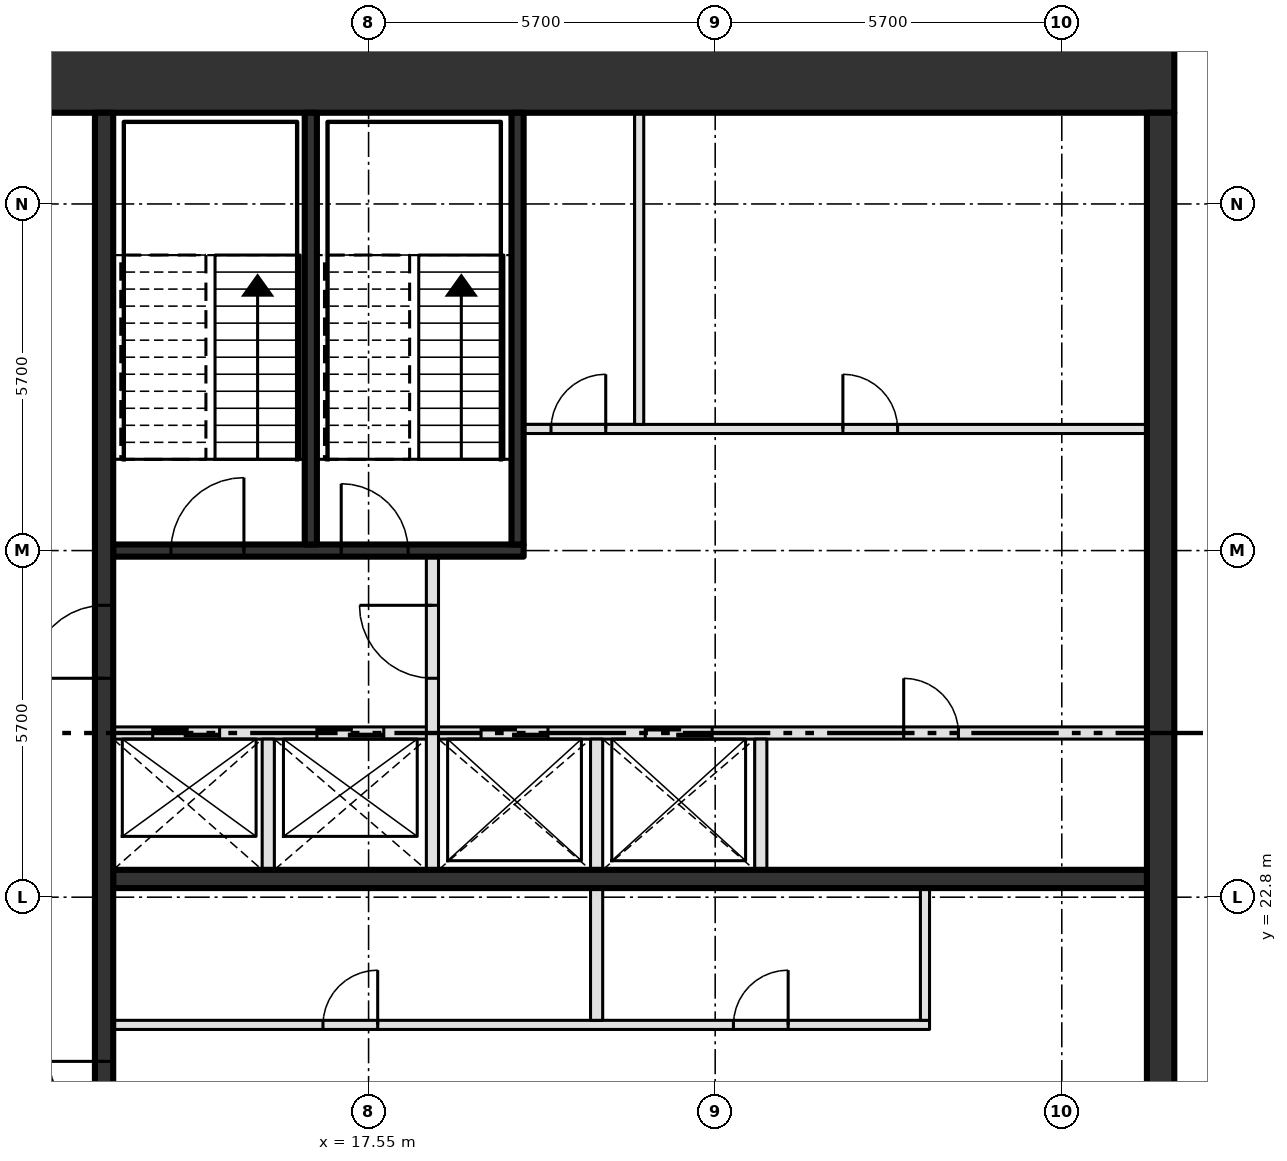
"""IFC4 building model, lengths in metres.
Left out: names, types, materials, properties, quantities, classifications, styles, units other than length and angle.
Written with IfcOpenShell. Run it as: python <this file> out.ifc"""

import sys

from ifc_helpers import new_model, si_unit, direction, frame, frame_2d, origin, place, context, subcontext, project, spatial, rectangle, extrude, element, fill, save


model = new_model("IFC4")
c1 = context("Model", 3, precision=1e-05, world=origin(), true_north=direction((0.0, 1.0)))
c2 = subcontext(c1, "Body", "Model", "MODEL_VIEW")
j1 = project(units=[si_unit("LENGTHUNIT", "METRE"), si_unit("PLANEANGLEUNIT", "RADIAN")], contexts=[c1])
p1 = place(None, origin())
s1 = spatial("IfcSite", under=j1, at=p1, CompositionType="ELEMENT")
p2 = place(p1, origin())
s2 = spatial("IfcBuilding", under=s1, at=p2, CompositionType="ELEMENT")
p3 = place(p2, frame((0.0, 0.0, 400.2)))
s3 = spatial("IfcBuildingStorey", under=s2, at=p3, CompositionType="ELEMENT", Elevation=400.2)
p4 = place(p3, frame((8.0, 36.3, -0.45), z_axis=(0.0, 0.0, 1.0), x_axis=(1.0, 0.0, 0.0)))
e1 = element("IfcWall", 1, at=p4, inside=s3, PredefinedType="SHEAR", context=c2, shape_type="SweptSolid", body=[
    extrude(rectangle(XDim=22.8, YDim=1.2, at=frame_2d((11.4, 0.0))), origin(), (0.0, 0.0, 1.0), 4.95),
])
p5 = place(p4, frame((2.3, 0.0, 0.45)))
e2 = element("IfcOpeningElement", 2, at=p5, cuts=e1, PredefinedType="OPENING", context=c2, shape_type="SweptSolid", body=[
    extrude(rectangle(XDim=1.8, YDim=2.1, at=frame_2d((0.9, 1.05))), frame((0.0, 0.61, 0.0), z_axis=(0.0, -1.0, 0.0), x_axis=(1.0, 0.0, 0.0)), (0.0, 0.0, 1.0), 1.22),
])
p6 = place(p3, frame((30.575, 14.55, -0.45), z_axis=(0.0, 0.0, 1.0), x_axis=(0.0, 1.0, 0.0)))
e3 = element("IfcWall", 3, at=p6, inside=s3, PredefinedType="SHEAR", context=c2, shape_type="SweptSolid", body=[
    extrude(rectangle(XDim=21.15, YDim=0.45, at=frame_2d((10.575, 0.0))), origin(), (0.0, 0.0, 1.0), 4.95),
])
p7 = place(p3, frame((13.35, 20.7, 0.0), z_axis=(0.0, 0.0, 1.0), x_axis=(1.0, 0.0, 0.0)))
e4 = element("IfcWall", 4, at=p7, inside=s3, PredefinedType="PARTITIONING", context=c2, shape_type="SweptSolid", body=[
    extrude(rectangle(XDim=13.425, YDim=0.15, at=frame_2d((6.712, 0.0))), origin(), (0.0, 0.0, 1.0), 4.5),
])
p8 = place(p7, frame((3.45, 0.0, 0.0)))
e5 = element("IfcOpeningElement", 5, at=p8, cuts=e4, PredefinedType="OPENING", context=c2, shape_type="SweptSolid", body=[
    extrude(rectangle(XDim=0.9, YDim=2.1, at=frame_2d((0.45, 1.05))), frame((0.0, 0.085, 0.0), z_axis=(0.0, -1.0, 0.0), x_axis=(1.0, 0.0, 0.0)), (0.0, 0.0, 1.0), 0.17),
])
p9 = place(p7, frame((10.2, 0.0, 0.0)))
e6 = element("IfcOpeningElement", 6, at=p9, cuts=e4, PredefinedType="OPENING", context=c2, shape_type="SweptSolid", body=[
    extrude(rectangle(XDim=0.9, YDim=2.1, at=frame_2d((0.45, 1.05))), frame((0.0, 0.085, 0.0), z_axis=(0.0, -1.0, 0.0), x_axis=(1.0, 0.0, 0.0)), (0.0, 0.0, 1.0), 0.17),
])
p10 = place(p3, frame((13.35, 23.1, 0.0), z_axis=(0.0, 0.0, 1.0), x_axis=(1.0, 0.0, 0.0)))
e7 = element("IfcWall", 7, at=p10, inside=s3, PredefinedType="SHEAR", context=c2, shape_type="SweptSolid", body=[
    extrude(rectangle(XDim=17.0, YDim=0.3, at=frame_2d((8.5, 0.0))), origin(), (0.0, 0.0, 1.0), 4.5),
])
p11 = place(p3, frame((13.35, 25.5, 0.0), z_axis=(0.0, 0.0, 1.0), x_axis=(1.0, 0.0, 0.0)))
e8 = element("IfcWall", 8, at=p11, inside=s3, PredefinedType="SOLIDWALL", context=c2, shape_type="SweptSolid", body=[
    extrude(rectangle(XDim=17.0, YDim=0.2, at=frame_2d((8.5, 0.0))), origin(), (0.0, 0.0, 1.0), 4.5),
])
p12 = place(p11, frame((0.65, 0.0, 0.0)))
e9 = element("IfcOpeningElement", 9, at=p12, cuts=e8, PredefinedType="OPENING", context=c2, shape_type="SweptSolid", body=[
    extrude(rectangle(XDim=1.1, YDim=2.1, at=frame_2d((0.55, 1.05))), frame((0.0, 0.11, 0.0), z_axis=(0.0, -1.0, 0.0), x_axis=(1.0, 0.0, 0.0)), (0.0, 0.0, 1.0), 0.22),
])
p13 = place(p11, frame((3.35, 0.0, 0.0)))
e10 = element("IfcOpeningElement", 10, at=p13, cuts=e8, PredefinedType="OPENING", context=c2, shape_type="SweptSolid", body=[
    extrude(rectangle(XDim=1.1, YDim=2.1, at=frame_2d((0.55, 1.05))), frame((0.0, 0.11, 0.0), z_axis=(0.0, -1.0, 0.0), x_axis=(1.0, 0.0, 0.0)), (0.0, 0.0, 1.0), 0.22),
])
p14 = place(p11, frame((6.05, 0.0, 0.0)))
e11 = element("IfcOpeningElement", 11, at=p14, cuts=e8, PredefinedType="OPENING", context=c2, shape_type="SweptSolid", body=[
    extrude(rectangle(XDim=1.1, YDim=2.1, at=frame_2d((0.55, 1.05))), frame((0.0, 0.11, 0.0), z_axis=(0.0, -1.0, 0.0), x_axis=(1.0, 0.0, 0.0)), (0.0, 0.0, 1.0), 0.22),
])
p15 = place(p11, frame((8.75, 0.0, 0.0)))
e12 = element("IfcOpeningElement", 12, at=p15, cuts=e8, PredefinedType="OPENING", context=c2, shape_type="SweptSolid", body=[
    extrude(rectangle(XDim=1.1, YDim=2.1, at=frame_2d((0.55, 1.05))), frame((0.0, 0.11, 0.0), z_axis=(0.0, -1.0, 0.0), x_axis=(1.0, 0.0, 0.0)), (0.0, 0.0, 1.0), 0.22),
])
p16 = place(p11, frame((13.0, 0.0, 0.0)))
e13 = element("IfcOpeningElement", 13, at=p16, cuts=e8, PredefinedType="OPENING", context=c2, shape_type="SweptSolid", body=[
    extrude(rectangle(XDim=0.9, YDim=2.1, at=frame_2d((0.45, 1.05))), frame((0.0, 0.11, 0.0), z_axis=(0.0, -1.0, 0.0), x_axis=(1.0, 0.0, 0.0)), (0.0, 0.0, 1.0), 0.22),
])
p17 = place(p3, frame((13.35, 28.5, 0.0), z_axis=(0.0, 0.0, 1.0), x_axis=(1.0, 0.0, 0.0)))
e14 = element("IfcWall", 14, at=p17, inside=s3, PredefinedType="SOLIDWALL", context=c2, shape_type="SweptSolid", body=[
    extrude(rectangle(XDim=6.75, YDim=0.2, at=frame_2d((3.375, 0.0))), origin(), (0.0, 0.0, 1.0), 4.5),
])
p18 = place(p17, frame((0.95, 0.0, 0.0)))
e15 = element("IfcOpeningElement", 15, at=p18, cuts=e14, PredefinedType="OPENING", context=c2, shape_type="SweptSolid", body=[
    extrude(rectangle(XDim=1.2, YDim=2.1, at=frame_2d((0.6, 1.05))), frame((0.0, 0.11, 0.0), z_axis=(0.0, -1.0, 0.0), x_axis=(1.0, 0.0, 0.0)), (0.0, 0.0, 1.0), 0.22),
])
p19 = place(p17, frame((3.75, 0.0, 0.0)))
e16 = element("IfcOpeningElement", 16, at=p19, cuts=e14, PredefinedType="OPENING", context=c2, shape_type="SweptSolid", body=[
    extrude(rectangle(XDim=1.1, YDim=2.1, at=frame_2d((0.55, 1.05))), frame((0.0, 0.11, 0.0), z_axis=(0.0, -1.0, 0.0), x_axis=(1.0, 0.0, 0.0)), (0.0, 0.0, 1.0), 0.22),
])
p20 = place(p3, frame((20.1, 30.5, 0.0), z_axis=(0.0, 0.0, 1.0), x_axis=(1.0, 0.0, 0.0)))
e17 = element("IfcWall", 17, at=p20, inside=s3, PredefinedType="PARTITIONING", context=c2, shape_type="SweptSolid", body=[
    extrude(rectangle(XDim=10.25, YDim=0.15, at=frame_2d((5.125, 0.0))), origin(), (0.0, 0.0, 1.0), 4.5),
])
p21 = place(p20, frame((0.45, 0.0, 0.0)))
e18 = element("IfcOpeningElement", 18, at=p21, cuts=e17, PredefinedType="OPENING", context=c2, shape_type="SweptSolid", body=[
    extrude(rectangle(XDim=0.9, YDim=2.1, at=frame_2d((0.45, 1.05))), frame((0.0, 0.085, 0.0), z_axis=(0.0, -1.0, 0.0), x_axis=(1.0, 0.0, 0.0)), (0.0, 0.0, 1.0), 0.17),
])
p22 = place(p20, frame((5.25, 0.0, 0.0)))
e19 = element("IfcOpeningElement", 19, at=p22, cuts=e17, PredefinedType="OPENING", context=c2, shape_type="SweptSolid", body=[
    extrude(rectangle(XDim=0.9, YDim=2.1, at=frame_2d((0.45, 1.05))), frame((0.0, 0.085, 0.0), z_axis=(0.0, -1.0, 0.0), x_axis=(1.0, 0.0, 0.0)), (0.0, 0.0, 1.0), 0.17),
])
p23 = place(p3, frame((13.2, 14.55, 0.0), z_axis=(0.0, 0.0, 1.0), x_axis=(0.0, 1.0, 0.0)))
e20 = element("IfcWall", 20, at=p23, inside=s3, PredefinedType="SHEAR", context=c2, shape_type="SweptSolid", body=[
    extrude(rectangle(XDim=21.15, YDim=0.3, at=frame_2d((10.575, 0.0))), origin(), (0.0, 0.0, 1.0), 4.5),
])
p24 = place(p23, frame((3.75, 0.0, 0.0)))
e21 = element("IfcOpeningElement", 21, at=p24, cuts=e20, PredefinedType="OPENING", context=c2, shape_type="SweptSolid", body=[
    extrude(rectangle(XDim=1.8, YDim=2.1, at=frame_2d((0.9, 1.05))), frame((0.0, 0.16, 0.0), z_axis=(0.0, -1.0, 0.0), x_axis=(1.0, 0.0, 0.0)), (0.0, 0.0, 1.0), 0.32),
])
p25 = place(p23, frame((11.85, 0.0, 0.0)))
e22 = element("IfcOpeningElement", 22, at=p25, cuts=e20, PredefinedType="OPENING", context=c2, shape_type="SweptSolid", body=[
    extrude(rectangle(XDim=1.2, YDim=2.1, at=frame_2d((0.6, 1.05))), frame((0.0, 0.16, 0.0), z_axis=(0.0, -1.0, 0.0), x_axis=(1.0, 0.0, 0.0)), (0.0, 0.0, 1.0), 0.32),
])
p26 = place(p3, frame((15.9, 23.25, 0.0), z_axis=(0.0, 0.0, 1.0), x_axis=(0.0, 1.0, 0.0)))
e23 = element("IfcWall", 23, at=p26, inside=s3, PredefinedType="SOLIDWALL", context=c2, shape_type="SweptSolid", body=[
    extrude(rectangle(XDim=2.15, YDim=0.2, at=frame_2d((1.075, 0.0))), origin(), (0.0, 0.0, 1.0), 4.5),
])
p27 = place(p3, frame((16.6, 28.6, 0.0), z_axis=(0.0, 0.0, 1.0), x_axis=(0.0, 1.0, 0.0)))
e24 = element("IfcWall", 24, at=p27, inside=s3, PredefinedType="SOLIDWALL", context=c2, shape_type="SweptSolid", body=[
    extrude(rectangle(XDim=7.1, YDim=0.2, at=frame_2d((3.55, 0.0))), origin(), (0.0, 0.0, 1.0), 4.5),
])
p28 = place(p3, frame((18.6, 23.25, 0.0), z_axis=(0.0, 0.0, 1.0), x_axis=(0.0, 1.0, 0.0)))
e25 = element("IfcWall", 25, at=p28, inside=s3, PredefinedType="SOLIDWALL", context=c2, shape_type="SweptSolid", body=[
    extrude(rectangle(XDim=5.15, YDim=0.2, at=frame_2d((2.575, 0.0))), origin(), (0.0, 0.0, 1.0), 4.5),
])
p29 = place(p28, frame((3.15, 0.0, 0.0)))
e26 = element("IfcOpeningElement", 26, at=p29, cuts=e25, PredefinedType="OPENING", context=c2, shape_type="SweptSolid", body=[
    extrude(rectangle(XDim=1.2, YDim=2.1, at=frame_2d((0.6, 1.05))), frame((0.0, 0.11, 0.0), z_axis=(0.0, -1.0, 0.0), x_axis=(1.0, 0.0, 0.0)), (0.0, 0.0, 1.0), 0.22),
])
p30 = place(p3, frame((20.0, 28.6, 0.0), z_axis=(0.0, 0.0, 1.0), x_axis=(0.0, 1.0, 0.0)))
e27 = element("IfcWall", 27, at=p30, inside=s3, PredefinedType="SOLIDWALL", context=c2, shape_type="SweptSolid", body=[
    extrude(rectangle(XDim=7.1, YDim=0.2, at=frame_2d((3.55, 0.0))), origin(), (0.0, 0.0, 1.0), 4.5),
])
p31 = place(p3, frame((21.3, 20.775, 0.0), z_axis=(0.0, 0.0, 1.0), x_axis=(0.0, 1.0, 0.0)))
e28 = element("IfcWall", 28, at=p31, inside=s3, PredefinedType="SOLIDWALL", context=c2, shape_type="SweptSolid", body=[
    extrude(rectangle(XDim=4.625, YDim=0.2, at=frame_2d((2.312, 0.0))), origin(), (0.0, 0.0, 1.0), 4.5),
])
p32 = place(p3, frame((22.0, 30.575, 0.0), z_axis=(0.0, 0.0, 1.0), x_axis=(0.0, 1.0, 0.0)))
e29 = element("IfcWall", 29, at=p32, inside=s3, PredefinedType="PARTITIONING", context=c2, shape_type="SweptSolid", body=[
    extrude(rectangle(XDim=5.125, YDim=0.15, at=frame_2d((2.562, 0.0))), origin(), (0.0, 0.0, 1.0), 4.5),
])
p33 = place(p3, frame((24.0, 23.25, 0.0), z_axis=(0.0, 0.0, 1.0), x_axis=(0.0, 1.0, 0.0)))
e30 = element("IfcWall", 30, at=p33, inside=s3, PredefinedType="SOLIDWALL", context=c2, shape_type="SweptSolid", body=[
    extrude(rectangle(XDim=2.15, YDim=0.2, at=frame_2d((1.075, 0.0))), origin(), (0.0, 0.0, 1.0), 4.5),
])
p34 = place(p3, frame((26.7, 20.775, 0.0), z_axis=(0.0, 0.0, 1.0), x_axis=(0.0, 1.0, 0.0)))
e31 = element("IfcWall", 31, at=p34, inside=s3, PredefinedType="PARTITIONING", context=c2, shape_type="SweptSolid", body=[
    extrude(rectangle(XDim=2.175, YDim=0.15, at=frame_2d((1.087, 0.0))), origin(), (0.0, 0.0, 1.0), 4.5),
])
p35 = place(p12, origin())
e32 = element("IfcDoor", 32, at=p35, inside=s3, OperationType="SLIDING_TO_LEFT", PredefinedType="DOOR", context=c2, shape_type="SweptSolid", body=[
    extrude(rectangle(XDim=1.1, YDim=2.1, at=frame_2d((0.55, 1.05))), frame((0.0, 0.025, 0.0), z_axis=(0.0, -1.0, 0.0), x_axis=(1.0, 0.0, 0.0)), (0.0, 0.0, 1.0), 0.05),
])
fill(e9, e32)
p36 = place(p13, origin())
e33 = element("IfcDoor", 33, at=p36, inside=s3, OperationType="SLIDING_TO_LEFT", PredefinedType="DOOR", context=c2, shape_type="SweptSolid", body=[
    extrude(rectangle(XDim=1.1, YDim=2.1, at=frame_2d((0.55, 1.05))), frame((0.0, 0.025, 0.0), z_axis=(0.0, -1.0, 0.0), x_axis=(1.0, 0.0, 0.0)), (0.0, 0.0, 1.0), 0.05),
])
fill(e10, e33)
p37 = place(p14, origin())
e34 = element("IfcDoor", 34, at=p37, inside=s3, OperationType="SLIDING_TO_LEFT", PredefinedType="DOOR", context=c2, shape_type="SweptSolid", body=[
    extrude(rectangle(XDim=1.1, YDim=2.1, at=frame_2d((0.55, 1.05))), frame((0.0, 0.025, 0.0), z_axis=(0.0, -1.0, 0.0), x_axis=(1.0, 0.0, 0.0)), (0.0, 0.0, 1.0), 0.05),
])
fill(e11, e34)
p38 = place(p15, origin())
e35 = element("IfcDoor", 35, at=p38, inside=s3, OperationType="SLIDING_TO_LEFT", PredefinedType="DOOR", context=c2, shape_type="SweptSolid", body=[
    extrude(rectangle(XDim=1.1, YDim=2.1, at=frame_2d((0.55, 1.05))), frame((0.0, 0.025, 0.0), z_axis=(0.0, -1.0, 0.0), x_axis=(1.0, 0.0, 0.0)), (0.0, 0.0, 1.0), 0.05),
])
fill(e12, e35)
p39 = place(p8, origin())
e36 = element("IfcDoor", 36, at=p39, inside=s3, OperationType="SINGLE_SWING_RIGHT", PredefinedType="DOOR", context=c2, shape_type="SweptSolid", body=[
    extrude(rectangle(XDim=0.9, YDim=2.1, at=frame_2d((0.45, 1.05))), frame((0.0, 0.025, 0.0), z_axis=(0.0, -1.0, 0.0), x_axis=(1.0, 0.0, 0.0)), (0.0, 0.0, 1.0), 0.05),
])
fill(e5, e36)
p40 = place(p9, origin())
e37 = element("IfcDoor", 37, at=p40, inside=s3, OperationType="SINGLE_SWING_RIGHT", PredefinedType="DOOR", context=c2, shape_type="SweptSolid", body=[
    extrude(rectangle(XDim=0.9, YDim=2.1, at=frame_2d((0.45, 1.05))), frame((0.0, 0.025, 0.0), z_axis=(0.0, -1.0, 0.0), x_axis=(1.0, 0.0, 0.0)), (0.0, 0.0, 1.0), 0.05),
])
fill(e6, e37)
p41 = place(p16, origin())
e38 = element("IfcDoor", 38, at=p41, inside=s3, OperationType="SINGLE_SWING_LEFT", PredefinedType="DOOR", context=c2, shape_type="SweptSolid", body=[
    extrude(rectangle(XDim=0.9, YDim=2.1, at=frame_2d((0.45, 1.05))), frame((0.0, 0.025, 0.0), z_axis=(0.0, -1.0, 0.0), x_axis=(1.0, 0.0, 0.0)), (0.0, 0.0, 1.0), 0.05),
])
fill(e13, e38)
p42 = place(p21, origin())
e39 = element("IfcDoor", 39, at=p42, inside=s3, OperationType="SINGLE_SWING_RIGHT", PredefinedType="DOOR", context=c2, shape_type="SweptSolid", body=[
    extrude(rectangle(XDim=0.9, YDim=2.1, at=frame_2d((0.45, 1.05))), frame((0.0, 0.025, 0.0), z_axis=(0.0, -1.0, 0.0), x_axis=(1.0, 0.0, 0.0)), (0.0, 0.0, 1.0), 0.05),
])
fill(e18, e39)
p43 = place(p22, origin())
e40 = element("IfcDoor", 40, at=p43, inside=s3, OperationType="SINGLE_SWING_LEFT", PredefinedType="DOOR", context=c2, shape_type="SweptSolid", body=[
    extrude(rectangle(XDim=0.9, YDim=2.1, at=frame_2d((0.45, 1.05))), frame((0.0, 0.025, 0.0), z_axis=(0.0, -1.0, 0.0), x_axis=(1.0, 0.0, 0.0)), (0.0, 0.0, 1.0), 0.05),
])
fill(e19, e40)
p44 = place(p18, origin())
e41 = element("IfcDoor", 41, at=p44, inside=s3, OperationType="SINGLE_SWING_RIGHT", PredefinedType="DOOR", context=c2, shape_type="SweptSolid", body=[
    extrude(rectangle(XDim=1.2, YDim=2.1, at=frame_2d((0.6, 1.05))), frame((0.0, 0.025, 0.0), z_axis=(0.0, -1.0, 0.0), x_axis=(1.0, 0.0, 0.0)), (0.0, 0.0, 1.0), 0.05),
])
fill(e15, e41)
p45 = place(p19, origin())
e42 = element("IfcDoor", 42, at=p45, inside=s3, OperationType="SINGLE_SWING_LEFT", PredefinedType="DOOR", context=c2, shape_type="SweptSolid", body=[
    extrude(rectangle(XDim=1.1, YDim=2.1, at=frame_2d((0.55, 1.05))), frame((0.0, 0.025, 0.0), z_axis=(0.0, -1.0, 0.0), x_axis=(1.0, 0.0, 0.0)), (0.0, 0.0, 1.0), 0.05),
])
fill(e16, e42)
p46 = place(p24, origin())
e43 = element("IfcDoor", 43, at=p46, inside=s3, OperationType="DOUBLE_DOOR_SINGLE_SWING", PredefinedType="DOOR", context=c2, shape_type="SweptSolid", body=[
    extrude(rectangle(XDim=1.8, YDim=2.1, at=frame_2d((0.9, 1.05))), frame((0.0, 0.025, 0.0), z_axis=(0.0, -1.0, 0.0), x_axis=(1.0, 0.0, 0.0)), (0.0, 0.0, 1.0), 0.05),
])
fill(e21, e43)
p47 = place(p25, origin())
e44 = element("IfcDoor", 44, at=p47, inside=s3, OperationType="SINGLE_SWING_LEFT", PredefinedType="DOOR", context=c2, shape_type="SweptSolid", body=[
    extrude(rectangle(XDim=1.2, YDim=2.1, at=frame_2d((0.6, 1.05))), frame((0.0, 0.025, 0.0), z_axis=(0.0, -1.0, 0.0), x_axis=(1.0, 0.0, 0.0)), (0.0, 0.0, 1.0), 0.05),
])
fill(e22, e44)
p48 = place(p29, origin())
e45 = element("IfcDoor", 45, at=p48, inside=s3, OperationType="SINGLE_SWING_RIGHT", PredefinedType="DOOR", context=c2, shape_type="SweptSolid", body=[
    extrude(rectangle(XDim=1.2, YDim=2.1, at=frame_2d((0.6, 1.05))), frame((0.0, 0.025, 0.0), z_axis=(0.0, -1.0, 0.0), x_axis=(1.0, 0.0, 0.0)), (0.0, 0.0, 1.0), 0.05),
])
fill(e26, e45)
save(model, sys.argv[1])
